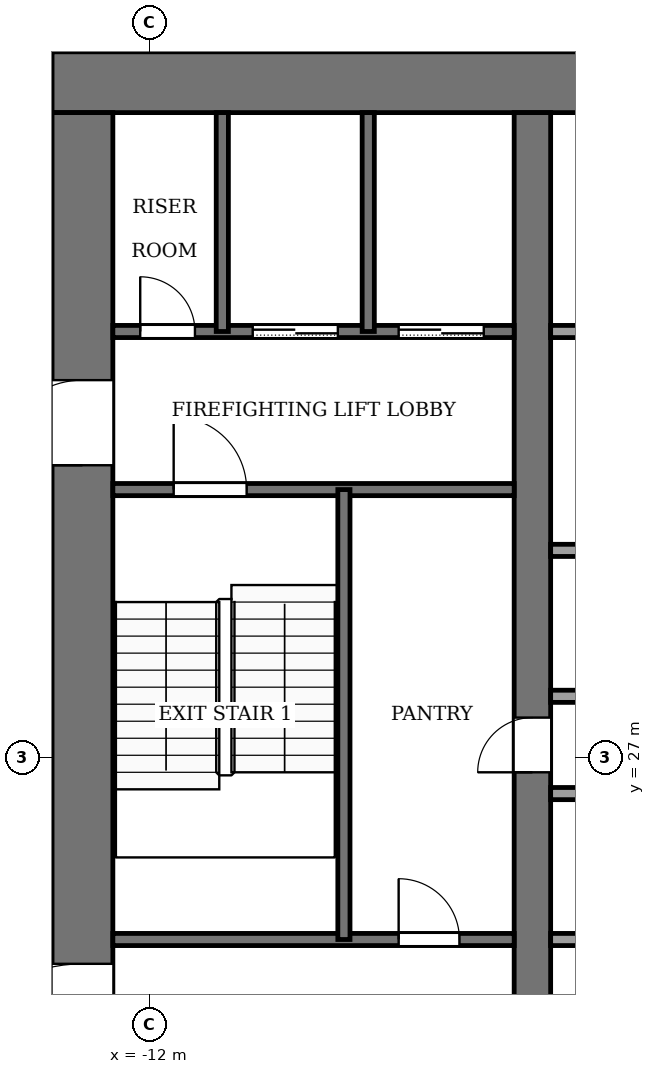
"""IFC4 building model, lengths in metres.
Left out: names, types, materials, properties, quantities, classifications, styles, units other than length and angle.
Written with IfcOpenShell. Run it as: python <this file> out.ifc"""

import sys

from ifc_helpers import new_model, si_unit, direction, frame, frame_2d, origin, place, context, subcontext, project, spatial, rectangle, extrude, element, fill, save


model = new_model("IFC4")
c1 = context("Model", 3, precision=1e-05, world=origin(), true_north=direction((0.0, 1.0)))
c2 = subcontext(c1, "Body", "Model", "MODEL_VIEW")
j1 = project(units=[si_unit("LENGTHUNIT", "METRE"), si_unit("PLANEANGLEUNIT", "RADIAN")], contexts=[c1])
p1 = place(None, origin())
s1 = spatial("IfcSite", under=j1, at=p1, CompositionType="ELEMENT")
p2 = place(p1, origin())
s2 = spatial("IfcBuilding", under=s1, at=p2, CompositionType="ELEMENT")
p3 = place(p2, frame((0.0, 0.0, 126.0)))
s3 = spatial("IfcBuildingStorey", under=s2, at=p3, CompositionType="ELEMENT", Elevation=126.0)
p4 = place(p3, frame((-13.6, 38.1, -0.13), z_axis=(0.0, 0.0, 1.0), x_axis=(1.0, 0.0, 0.0)))
e1 = element("IfcWall", 1, at=p4, inside=s3, PredefinedType="SHEAR", context=c2, shape_type="SweptSolid", body=[
    extrude(rectangle(XDim=27.2, YDim=1.0, at=frame_2d((13.6, 0.0))), origin(), (0.0, 0.0, 1.0), 4.0),
])
p5 = place(p3, frame((-13.1, 18.4, -0.13), z_axis=(0.0, 0.0, 1.0), x_axis=(0.0, 1.0, 0.0)))
e2 = element("IfcWall", 2, at=p5, inside=s3, PredefinedType="SHEAR", context=c2, shape_type="SweptSolid", body=[
    extrude(rectangle(XDim=19.2, YDim=1.0, at=frame_2d((9.6, 0.0))), origin(), (0.0, 0.0, 1.0), 4.0),
])
p6 = place(p5, frame((2.8, 0.0, 0.13)))
e3 = element("IfcOpeningElement", 3, at=p6, cuts=e2, PredefinedType="OPENING", context=c2, shape_type="SweptSolid", body=[
    extrude(rectangle(XDim=2.4, YDim=2.4, at=frame_2d((1.2, 1.2))), frame((0.0, 0.51, 0.0), z_axis=(0.0, -1.0, 0.0), x_axis=(1.0, 0.0, 0.0)), (0.0, 0.0, 1.0), 1.02),
])
p7 = place(p5, frame((13.4, 0.0, 0.13)))
e4 = element("IfcOpeningElement", 4, at=p7, cuts=e2, PredefinedType="OPENING", context=c2, shape_type="SweptSolid", body=[
    extrude(rectangle(XDim=1.4, YDim=2.2, at=frame_2d((0.7, 1.1))), frame((0.0, 0.51, 0.0), z_axis=(0.0, -1.0, 0.0), x_axis=(1.0, 0.0, 0.0)), (0.0, 0.0, 1.0), 1.02),
])
p8 = place(p3, frame((-5.7, 18.4, -0.13), z_axis=(0.0, 0.0, 1.0), x_axis=(0.0, 1.0, 0.0)))
e5 = element("IfcWall", 5, at=p8, inside=s3, PredefinedType="SHEAR", context=c2, shape_type="SweptSolid", body=[
    extrude(rectangle(XDim=19.2, YDim=0.6, at=frame_2d((9.6, 0.0))), origin(), (0.0, 0.0, 1.0), 4.0),
])
p9 = place(p8, frame((8.35, 0.0, 0.13)))
e6 = element("IfcOpeningElement", 6, at=p9, cuts=e5, PredefinedType="OPENING", context=c2, shape_type="SweptSolid", body=[
    extrude(rectangle(XDim=0.9, YDim=2.1, at=frame_2d((0.45, 1.05))), frame((0.0, 0.31, 0.0), z_axis=(0.0, -1.0, 0.0), x_axis=(1.0, 0.0, 0.0)), (0.0, 0.0, 1.0), 0.62),
])
p10 = place(p3, frame((-12.6, 24.0, 0.0), z_axis=(0.0, 0.0, 1.0), x_axis=(1.0, 0.0, 0.0)))
e7 = element("IfcWall", 7, at=p10, inside=s3, PredefinedType="PARTITIONING", context=c2, shape_type="SweptSolid", body=[
    extrude(rectangle(XDim=6.6, YDim=0.2, at=frame_2d((3.3, 0.0))), origin(), (0.0, 0.0, 1.0), 3.87),
])
p11 = place(p10, frame((4.7, 0.0, 0.0)))
e8 = element("IfcOpeningElement", 8, at=p11, cuts=e7, PredefinedType="OPENING", context=c2, shape_type="SweptSolid", body=[
    extrude(rectangle(XDim=1.0, YDim=2.1, at=frame_2d((0.5, 1.05))), frame((0.0, 0.11, 0.0), z_axis=(0.0, -1.0, 0.0), x_axis=(1.0, 0.0, 0.0)), (0.0, 0.0, 1.0), 0.22),
])
p12 = place(p3, frame((-5.4, 24.0, 0.0), z_axis=(0.0, 0.0, 1.0), x_axis=(1.0, 0.0, 0.0)))
e9 = element("IfcWall", 9, at=p12, inside=s3, PredefinedType="PARTITIONING", context=c2, shape_type="SweptSolid", body=[
    extrude(rectangle(XDim=10.8, YDim=0.2, at=frame_2d((5.4, 0.0))), origin(), (0.0, 0.0, 1.0), 3.87),
])
p13 = place(p12, frame((0.75, 0.0, 0.0)))
e10 = element("IfcOpeningElement", 10, at=p13, cuts=e9, PredefinedType="OPENING", context=c2, shape_type="SweptSolid", body=[
    extrude(rectangle(XDim=1.2, YDim=2.2, at=frame_2d((0.6, 1.1))), frame((0.0, 0.11, 0.0), z_axis=(0.0, -1.0, 0.0), x_axis=(1.0, 0.0, 0.0)), (0.0, 0.0, 1.0), 0.22),
])
p14 = place(p12, frame((3.45, 0.0, 0.0)))
e11 = element("IfcOpeningElement", 11, at=p14, cuts=e9, PredefinedType="OPENING", context=c2, shape_type="SweptSolid", body=[
    extrude(rectangle(XDim=1.2, YDim=2.2, at=frame_2d((0.6, 1.1))), frame((0.0, 0.11, 0.0), z_axis=(0.0, -1.0, 0.0), x_axis=(1.0, 0.0, 0.0)), (0.0, 0.0, 1.0), 0.22),
])
p15 = place(p12, frame((6.15, 0.0, 0.0)))
e12 = element("IfcOpeningElement", 12, at=p15, cuts=e9, PredefinedType="OPENING", context=c2, shape_type="SweptSolid", body=[
    extrude(rectangle(XDim=1.2, YDim=2.2, at=frame_2d((0.6, 1.1))), frame((0.0, 0.11, 0.0), z_axis=(0.0, -1.0, 0.0), x_axis=(1.0, 0.0, 0.0)), (0.0, 0.0, 1.0), 0.22),
])
p16 = place(p12, frame((8.85, 0.0, 0.0)))
e13 = element("IfcOpeningElement", 13, at=p16, cuts=e9, PredefinedType="OPENING", context=c2, shape_type="SweptSolid", body=[
    extrude(rectangle(XDim=1.2, YDim=2.2, at=frame_2d((0.6, 1.1))), frame((0.0, 0.11, 0.0), z_axis=(0.0, -1.0, 0.0), x_axis=(1.0, 0.0, 0.0)), (0.0, 0.0, 1.0), 0.22),
])
for number, where, z_axis, x_axis in (
    (14, (-5.4, 26.4, 0.0), (0.0, 0.0, 1.0), (1.0, 0.0, 0.0)),
    (15, (-5.4, 28.0, 0.0), (0.0, 0.0, 1.0), (1.0, 0.0, 0.0)),
    (16, (-5.4, 30.4, 0.0), (0.0, 0.0, 1.0), (1.0, 0.0, 0.0)),
):
    element("IfcWall", number, at=place(p3, frame(where, z_axis=z_axis, x_axis=x_axis)), inside=s3, PredefinedType="PARTITIONING", context=c2, shape_type="SweptSolid", body=[
        extrude(rectangle(XDim=10.8, YDim=0.2, at=frame_2d((5.4, 0.0))), origin(), (0.0, 0.0, 1.0), 3.87),
    ])
p17 = place(p3, frame((-12.6, 31.4, 0.0), z_axis=(0.0, 0.0, 1.0), x_axis=(1.0, 0.0, 0.0)))
e17 = element("IfcWall", 17, at=p17, inside=s3, PredefinedType="PARTITIONING", context=c2, shape_type="SweptSolid", body=[
    extrude(rectangle(XDim=6.6, YDim=0.2, at=frame_2d((3.3, 0.0))), origin(), (0.0, 0.0, 1.0), 3.87),
])
p18 = place(p17, frame((1.0, 0.0, 0.0)))
e18 = element("IfcOpeningElement", 18, at=p18, cuts=e17, PredefinedType="OPENING", context=c2, shape_type="SweptSolid", body=[
    extrude(rectangle(XDim=1.2, YDim=2.2, at=frame_2d((0.6, 1.1))), frame((0.0, 0.11, 0.0), z_axis=(0.0, -1.0, 0.0), x_axis=(1.0, 0.0, 0.0)), (0.0, 0.0, 1.0), 0.22),
])
p19 = place(p3, frame((-12.6, 34.0, 0.0), z_axis=(0.0, 0.0, 1.0), x_axis=(1.0, 0.0, 0.0)))
e19 = element("IfcWall", 19, at=p19, inside=s3, PredefinedType="PARTITIONING", context=c2, shape_type="SweptSolid", body=[
    extrude(rectangle(XDim=6.6, YDim=0.2, at=frame_2d((3.3, 0.0))), origin(), (0.0, 0.0, 1.0), 3.87),
])
p20 = place(p19, frame((4.7, 0.0, 0.0)))
e20 = element("IfcOpeningElement", 20, at=p20, cuts=e19, PredefinedType="OPENING", context=c2, shape_type="SweptSolid", body=[
    extrude(rectangle(XDim=1.4, YDim=2.2, at=frame_2d((0.7, 1.1))), frame((0.0, 0.11, 0.0), z_axis=(0.0, -1.0, 0.0), x_axis=(1.0, 0.0, 0.0)), (0.0, 0.0, 1.0), 0.22),
])
p21 = place(p19, frame((2.3, 0.0, 0.0)))
e21 = element("IfcOpeningElement", 21, at=p21, cuts=e19, PredefinedType="OPENING", context=c2, shape_type="SweptSolid", body=[
    extrude(rectangle(XDim=1.4, YDim=2.2, at=frame_2d((0.7, 1.1))), frame((0.0, 0.11, 0.0), z_axis=(0.0, -1.0, 0.0), x_axis=(1.0, 0.0, 0.0)), (0.0, 0.0, 1.0), 0.22),
])
p22 = place(p19, frame((0.45, 0.0, 0.0)))
e22 = element("IfcOpeningElement", 22, at=p22, cuts=e19, PredefinedType="OPENING", context=c2, shape_type="SweptSolid", body=[
    extrude(rectangle(XDim=0.9, YDim=2.1, at=frame_2d((0.45, 1.05))), frame((0.0, 0.11, 0.0), z_axis=(0.0, -1.0, 0.0), x_axis=(1.0, 0.0, 0.0)), (0.0, 0.0, 1.0), 0.22),
])
p23 = place(p3, frame((-5.4, 34.0, 0.0), z_axis=(0.0, 0.0, 1.0), x_axis=(1.0, 0.0, 0.0)))
e23 = element("IfcWall", 23, at=p23, inside=s3, PredefinedType="PARTITIONING", context=c2, shape_type="SweptSolid", body=[
    extrude(rectangle(XDim=10.8, YDim=0.2, at=frame_2d((5.4, 0.0))), origin(), (0.0, 0.0, 1.0), 3.87),
])
p24 = place(p23, frame((6.15, 0.0, 0.0)))
e24 = element("IfcOpeningElement", 24, at=p24, cuts=e23, PredefinedType="OPENING", context=c2, shape_type="SweptSolid", body=[
    extrude(rectangle(XDim=1.2, YDim=2.2, at=frame_2d((0.6, 1.1))), frame((0.0, 0.11, 0.0), z_axis=(0.0, -1.0, 0.0), x_axis=(1.0, 0.0, 0.0)), (0.0, 0.0, 1.0), 0.22),
])
p25 = place(p23, frame((8.95, 0.0, 0.0)))
e25 = element("IfcOpeningElement", 25, at=p25, cuts=e23, PredefinedType="OPENING", context=c2, shape_type="SweptSolid", body=[
    extrude(rectangle(XDim=1.0, YDim=2.1, at=frame_2d((0.5, 1.05))), frame((0.0, 0.11, 0.0), z_axis=(0.0, -1.0, 0.0), x_axis=(1.0, 0.0, 0.0)), (0.0, 0.0, 1.0), 0.22),
])
p26 = place(p3, frame((-10.8, 34.0, 0.0), z_axis=(0.0, 0.0, 1.0), x_axis=(0.0, 1.0, 0.0)))
e26 = element("IfcWall", 26, at=p26, inside=s3, PredefinedType="PARTITIONING", context=c2, shape_type="SweptSolid", body=[
    extrude(rectangle(XDim=3.6, YDim=0.2, at=frame_2d((1.8, 0.0))), origin(), (0.0, 0.0, 1.0), 3.87),
])
p27 = place(p3, frame((-8.8, 24.0, 0.0), z_axis=(0.0, 0.0, 1.0), x_axis=(0.0, 1.0, 0.0)))
e27 = element("IfcWall", 27, at=p27, inside=s3, PredefinedType="PARTITIONING", context=c2, shape_type="SweptSolid", body=[
    extrude(rectangle(XDim=7.4, YDim=0.2, at=frame_2d((3.7, 0.0))), origin(), (0.0, 0.0, 1.0), 3.87),
])
p28 = place(p3, frame((-8.4, 34.0, 0.0), z_axis=(0.0, 0.0, 1.0), x_axis=(0.0, 1.0, 0.0)))
e28 = element("IfcWall", 28, at=p28, inside=s3, PredefinedType="PARTITIONING", context=c2, shape_type="SweptSolid", body=[
    extrude(rectangle(XDim=3.6, YDim=0.2, at=frame_2d((1.8, 0.0))), origin(), (0.0, 0.0, 1.0), 3.87),
])
p29 = place(p20, origin())
e29 = element("IfcDoor", 29, at=p29, inside=s3, OperationType="SLIDING_TO_LEFT", PredefinedType="DOOR", context=c2, shape_type="SweptSolid", body=[
    extrude(rectangle(XDim=1.4, YDim=2.2, at=frame_2d((0.7, 1.1))), frame((0.0, 0.025, 0.0), z_axis=(0.0, -1.0, 0.0), x_axis=(1.0, 0.0, 0.0)), (0.0, 0.0, 1.0), 0.05),
])
fill(e20, e29)
p30 = place(p21, origin())
e30 = element("IfcDoor", 30, at=p30, inside=s3, OperationType="SLIDING_TO_LEFT", PredefinedType="DOOR", context=c2, shape_type="SweptSolid", body=[
    extrude(rectangle(XDim=1.4, YDim=2.2, at=frame_2d((0.7, 1.1))), frame((0.0, 0.025, 0.0), z_axis=(0.0, -1.0, 0.0), x_axis=(1.0, 0.0, 0.0)), (0.0, 0.0, 1.0), 0.05),
])
fill(e21, e30)
p31 = place(p22, origin())
e31 = element("IfcDoor", 31, at=p31, inside=s3, OperationType="SINGLE_SWING_RIGHT", PredefinedType="DOOR", context=c2, shape_type="SweptSolid", body=[
    extrude(rectangle(XDim=0.9, YDim=2.1, at=frame_2d((0.45, 1.05))), frame((0.0, 0.025, 0.0), z_axis=(0.0, -1.0, 0.0), x_axis=(1.0, 0.0, 0.0)), (0.0, 0.0, 1.0), 0.05),
])
fill(e22, e31)
p32 = place(p11, origin())
e32 = element("IfcDoor", 32, at=p32, inside=s3, OperationType="SINGLE_SWING_LEFT", PredefinedType="DOOR", context=c2, shape_type="SweptSolid", body=[
    extrude(rectangle(XDim=1.0, YDim=2.1, at=frame_2d((0.5, 1.05))), frame((0.0, 0.025, 0.0), z_axis=(0.0, -1.0, 0.0), x_axis=(1.0, 0.0, 0.0)), (0.0, 0.0, 1.0), 0.05),
])
fill(e8, e32)
p33 = place(p9, origin())
e33 = element("IfcDoor", 33, at=p33, inside=s3, OperationType="SINGLE_SWING_RIGHT", PredefinedType="DOOR", context=c2, shape_type="SweptSolid", body=[
    extrude(rectangle(XDim=0.9, YDim=2.1, at=frame_2d((0.45, 1.05))), frame((0.0, 0.025, 0.0), z_axis=(0.0, -1.0, 0.0), x_axis=(1.0, 0.0, 0.0)), (0.0, 0.0, 1.0), 0.05),
])
fill(e6, e33)
p34 = place(p18, origin())
e34 = element("IfcDoor", 34, at=p34, inside=s3, OperationType="SINGLE_SWING_RIGHT", PredefinedType="DOOR", context=c2, shape_type="SweptSolid", body=[
    extrude(rectangle(XDim=1.2, YDim=2.2, at=frame_2d((0.6, 1.1))), frame((0.0, 0.025, 0.0), z_axis=(0.0, -1.0, 0.0), x_axis=(1.0, 0.0, 0.0)), (0.0, 0.0, 1.0), 0.05),
])
fill(e18, e34)
p35 = place(p6, origin())
e35 = element("IfcDoor", 35, at=p35, inside=s3, OperationType="DOUBLE_DOOR_SINGLE_SWING", PredefinedType="DOOR", context=c2, shape_type="SweptSolid", body=[
    extrude(rectangle(XDim=2.4, YDim=2.4, at=frame_2d((1.2, 1.2))), frame((0.0, 0.025, 0.0), z_axis=(0.0, -1.0, 0.0), x_axis=(1.0, 0.0, 0.0)), (0.0, 0.0, 1.0), 0.05),
])
fill(e3, e35)
p36 = place(p7, origin())
e36 = element("IfcDoor", 36, at=p36, inside=s3, OperationType="SINGLE_SWING_RIGHT", PredefinedType="DOOR", context=c2, shape_type="SweptSolid", body=[
    extrude(rectangle(XDim=1.4, YDim=2.2, at=frame_2d((0.7, 1.1))), frame((0.0, 0.025, 0.0), z_axis=(0.0, -1.0, 0.0), x_axis=(1.0, 0.0, 0.0)), (0.0, 0.0, 1.0), 0.05),
])
fill(e4, e36)
save(model, sys.argv[1])
